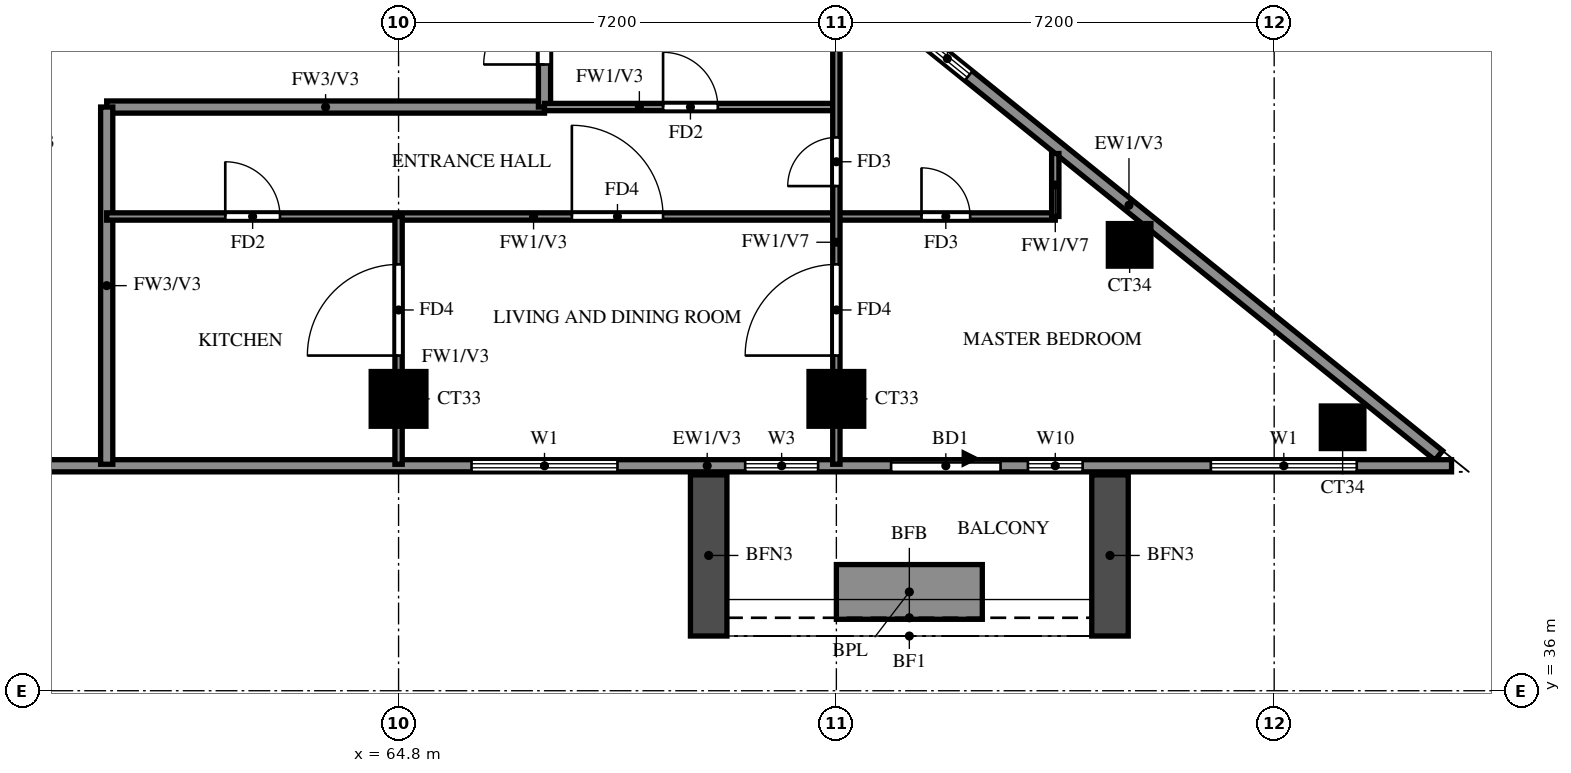
"""IFC4 building model, lengths in metres.
Left out: names, types, materials, properties, quantities, classifications, styles, units other than length and angle.
Written with IfcOpenShell. Run it as: python <this file> out.ifc"""

import sys

from ifc_helpers import new_model, si_unit, direction, frame, frame_2d, origin, origin_2d, place, context, subcontext, project, spatial, rectangle, extrude, source, transform, mapped, element, fill, save


model = new_model("IFC4")
c1 = context("Model", 3, precision=1e-05, world=origin(), true_north=direction((0.0, 1.0)))
c2 = subcontext(c1, "Body", "Model", "MODEL_VIEW")
j1 = project(units=[si_unit("LENGTHUNIT", "METRE"), si_unit("PLANEANGLEUNIT", "RADIAN")], contexts=[c1])
p1 = place(None, origin())
s1 = spatial("IfcSite", under=j1, at=p1, CompositionType="ELEMENT")
p2 = place(p1, origin())
s2 = spatial("IfcBuilding", under=s1, at=p2, CompositionType="ELEMENT")
p3 = place(p2, frame((0.0, 0.0, 218.5)))
s3 = spatial("IfcBuildingStorey", under=s2, at=p3, CompositionType="ELEMENT", Elevation=218.5)
m1 = source(origin(), c2, "Body", "SweptSolid", [
    extrude(rectangle(XDim=0.7, YDim=0.7, at=origin_2d()), origin(), (0.0, 0.0, 1.0), 3.22),
])
p4 = place(p3, frame((80.326, 40.333, 0.0), z_axis=(0.0, 0.0, 1.0), x_axis=(1.0, 0.0, 0.0)))
e1 = element("IfcColumn", 1, at=p4, inside=s3, PredefinedType="COLUMN", context=c2, shape_type="MappedRepresentation", body=[
    mapped(m1, transform((0.0, 0.0, 0.0))),
])
m2 = source(origin(), c2, "Body", "SweptSolid", [
    extrude(rectangle(XDim=0.9, YDim=0.9, at=origin_2d()), origin(), (0.0, 0.0, 1.0), 3.22),
])
for number, where, z_axis, x_axis in (
    (2, (64.8, 40.8, 0.0), (0.0, 0.0, 1.0), (1.0, 0.0, 0.0)),
    (3, (72.0, 40.8, 0.0), (0.0, 0.0, 1.0), (1.0, 0.0, 0.0)),
):
    element("IfcColumn", number, at=place(p3, frame(where, z_axis=z_axis, x_axis=x_axis)), inside=s3, PredefinedType="COLUMN", context=c2, shape_type="MappedRepresentation", body=[
        mapped(m2, transform((0.0, 0.0, 0.0))),
    ])
p5 = place(p3, frame((76.823, 43.333, 0.0), z_axis=(0.0, 0.0, 1.0), x_axis=(1.0, 0.0, 0.0)))
e4 = element("IfcColumn", 4, at=p5, inside=s3, PredefinedType="COLUMN", context=c2, shape_type="MappedRepresentation", body=[
    mapped(m1, transform((0.0, 0.0, 0.0))),
])
p6 = place(p3, frame((81.907, 39.87, 0.0), z_axis=(0.0, 0.0, 1.0), x_axis=(-0.777936274417, 0.62834318087, 0.0)))
e5 = element("IfcWall", 5, at=p6, inside=s3, PredefinedType="SOLIDWALL", context=c2, shape_type="SweptSolid", body=[
    extrude(rectangle(XDim=13.099, YDim=0.2, at=frame_2d((6.549, 0.0))), origin(), (0.0, 0.0, 1.0), 3.22),
])
p7 = place(p6, frame((9.938, 0.0, 1.5)))
e6 = element("IfcOpeningElement", 6, at=p7, cuts=e5, PredefinedType="OPENING", context=c2, shape_type="SweptSolid", body=[
    extrude(rectangle(XDim=0.9, YDim=0.9, at=frame_2d((0.45, 0.45))), frame((0.0, 0.11, 0.0), z_axis=(0.0, -1.0, 0.0), x_axis=(1.0, 0.0, 0.0)), (0.0, 0.0, 1.0), 0.22),
])
p8 = place(p3, frame((58.8, 39.7, 0.0), z_axis=(0.0, 0.0, 1.0), x_axis=(1.0, 0.0, 0.0)))
e7 = element("IfcWall", 7, at=p8, inside=s3, PredefinedType="SOLIDWALL", context=c2, shape_type="SweptSolid", body=[
    extrude(rectangle(XDim=23.317, YDim=0.2, at=frame_2d((11.658, 0.0))), origin(), (0.0, 0.0, 1.0), 3.22),
])
p9 = place(p8, frame((14.1, 0.0, 0.0)))
e8 = element("IfcOpeningElement", 8, at=p9, cuts=e7, PredefinedType="OPENING", context=c2, shape_type="SweptSolid", body=[
    extrude(rectangle(XDim=1.8, YDim=2.4, at=frame_2d((0.9, 1.2))), frame((0.0, 0.11, 0.0), z_axis=(0.0, -1.0, 0.0), x_axis=(1.0, 0.0, 0.0)), (0.0, 0.0, 1.0), 0.22),
])
p10 = place(p8, frame((7.2, 0.0, 0.6)))
e9 = element("IfcOpeningElement", 9, at=p10, cuts=e7, PredefinedType="OPENING", context=c2, shape_type="SweptSolid", body=[
    extrude(rectangle(XDim=2.4, YDim=2.4, at=frame_2d((1.2, 1.2))), frame((0.0, 0.11, 0.0), z_axis=(0.0, -1.0, 0.0), x_axis=(1.0, 0.0, 0.0)), (0.0, 0.0, 1.0), 0.22),
])
p11 = place(p8, frame((11.7, 0.0, 0.6)))
e10 = element("IfcOpeningElement", 10, at=p11, cuts=e7, PredefinedType="OPENING", context=c2, shape_type="SweptSolid", body=[
    extrude(rectangle(XDim=1.2, YDim=2.4, at=frame_2d((0.6, 1.2))), frame((0.0, 0.11, 0.0), z_axis=(0.0, -1.0, 0.0), x_axis=(1.0, 0.0, 0.0)), (0.0, 0.0, 1.0), 0.22),
])
p12 = place(p8, frame((16.35, 0.0, 0.6)))
e11 = element("IfcOpeningElement", 11, at=p12, cuts=e7, PredefinedType="OPENING", context=c2, shape_type="SweptSolid", body=[
    extrude(rectangle(XDim=0.9, YDim=2.4, at=frame_2d((0.45, 1.2))), frame((0.0, 0.11, 0.0), z_axis=(0.0, -1.0, 0.0), x_axis=(1.0, 0.0, 0.0)), (0.0, 0.0, 1.0), 0.22),
])
p13 = place(p8, frame((19.358, 0.0, 0.6)))
e12 = element("IfcOpeningElement", 12, at=p13, cuts=e7, PredefinedType="OPENING", context=c2, shape_type="SweptSolid", body=[
    extrude(rectangle(XDim=2.4, YDim=2.4, at=frame_2d((1.2, 1.2))), frame((0.0, 0.11, 0.0), z_axis=(0.0, -1.0, 0.0), x_axis=(1.0, 0.0, 0.0)), (0.0, 0.0, 1.0), 0.22),
])
for number, where, z_axis, x_axis in (
    (13, (69.9, 39.55, 0.0), (0.0, 0.0, 1.0), (0.0, -1.0, 0.0)),
    (14, (76.5, 39.55, 0.0), (0.0, 0.0, 1.0), (0.0, -1.0, 0.0)),
):
    element("IfcWall", number, at=place(p3, frame(where, z_axis=z_axis, x_axis=x_axis)), inside=s3, PredefinedType="SOLIDWALL", context=c2, shape_type="SweptSolid", body=[
        extrude(rectangle(XDim=2.65, YDim=0.6, at=frame_2d((1.325, 0.0))), origin(), (0.0, 0.0, 1.0), 2.85),
    ])
p14 = place(p3, frame((72.0, 37.625, 0.0), z_axis=(0.0, 0.0, 1.0), x_axis=(1.0, 0.0, 0.0)))
e15 = element("IfcWall", 15, at=p14, inside=s3, PredefinedType="SOLIDWALL", context=c2, shape_type="SweptSolid", body=[
    extrude(rectangle(XDim=2.4, YDim=0.9, at=frame_2d((1.2, 0.0))), origin(), (0.0, 0.0, 1.0), 0.9),
])
p15 = place(p3, frame((60.0, 45.6, 0.0), z_axis=(0.0, 0.0, 1.0), x_axis=(1.0, 0.0, 0.0)))
e16 = element("IfcWall", 16, at=p15, inside=s3, PredefinedType="SOLIDWALL", context=c2, shape_type="SweptSolid", body=[
    extrude(rectangle(XDim=7.2, YDim=0.2, at=frame_2d((3.6, 0.0))), origin(), (0.0, 0.0, 1.0), 3.22),
])
p16 = place(p3, frame((60.0, 39.725, 0.0), z_axis=(0.0, 0.0, 1.0), x_axis=(0.0, 1.0, 0.0)))
e17 = element("IfcWall", 17, at=p16, inside=s3, PredefinedType="SOLIDWALL", context=c2, shape_type="SweptSolid", body=[
    extrude(rectangle(XDim=5.875, YDim=0.2, at=frame_2d((2.938, 0.0))), origin(), (0.0, 0.0, 1.0), 3.22),
])
p17 = place(p3, frame((67.2, 45.6, 0.0), z_axis=(0.0, 0.0, 1.0), x_axis=(0.0, 1.0, 0.0)))
e18 = element("IfcWall", 18, at=p17, inside=s3, PredefinedType="SOLIDWALL", context=c2, shape_type="SweptSolid", body=[
    extrude(rectangle(XDim=8.4, YDim=0.2, at=frame_2d((4.2, 0.0))), origin(), (0.0, 0.0, 1.0), 3.22),
])
p18 = place(p17, frame((6.7, 0.0, 0.0)))
e19 = element("IfcOpeningElement", 19, at=p18, cuts=e18, PredefinedType="OPENING", context=c2, shape_type="SweptSolid", body=[
    extrude(rectangle(XDim=1.0, YDim=2.1, at=frame_2d((0.5, 1.05))), frame((0.0, 0.11, 0.0), z_axis=(0.0, -1.0, 0.0), x_axis=(1.0, 0.0, 0.0)), (0.0, 0.0, 1.0), 0.22),
])
p19 = place(p17, frame((0.7, 0.0, 0.0)))
e20 = element("IfcOpeningElement", 20, at=p19, cuts=e18, PredefinedType="OPENING", context=c2, shape_type="SweptSolid", body=[
    extrude(rectangle(XDim=1.0, YDim=2.1, at=frame_2d((0.5, 1.05))), frame((0.0, 0.11, 0.0), z_axis=(0.0, -1.0, 0.0), x_axis=(1.0, 0.0, 0.0)), (0.0, 0.0, 1.0), 0.22),
])
p20 = place(p3, frame((60.0, 43.8, 0.0), z_axis=(0.0, 0.0, 1.0), x_axis=(1.0, 0.0, 0.0)))
e21 = element("IfcWall", 21, at=p20, inside=s3, PredefinedType="PARTITIONING", context=c2, shape_type="SweptSolid", body=[
    extrude(rectangle(XDim=15.6, YDim=0.12, at=frame_2d((7.8, 0.0))), origin(), (0.0, 0.0, 1.0), 3.22),
])
p21 = place(p20, frame((7.65, 0.0, 0.0)))
e22 = element("IfcOpeningElement", 22, at=p21, cuts=e21, PredefinedType="OPENING", context=c2, shape_type="SweptSolid", body=[
    extrude(rectangle(XDim=1.5, YDim=2.1, at=frame_2d((0.75, 1.05))), frame((0.0, 0.07, 0.0), z_axis=(0.0, -1.0, 0.0), x_axis=(1.0, 0.0, 0.0)), (0.0, 0.0, 1.0), 0.14),
])
p22 = place(p20, frame((1.95, 0.0, 0.0)))
e23 = element("IfcOpeningElement", 23, at=p22, cuts=e21, PredefinedType="OPENING", context=c2, shape_type="SweptSolid", body=[
    extrude(rectangle(XDim=0.9, YDim=2.1, at=frame_2d((0.45, 1.05))), frame((0.0, 0.07, 0.0), z_axis=(0.0, -1.0, 0.0), x_axis=(1.0, 0.0, 0.0)), (0.0, 0.0, 1.0), 0.14),
])
p23 = place(p20, frame((13.4, 0.0, 0.0)))
e24 = element("IfcOpeningElement", 24, at=p23, cuts=e21, PredefinedType="OPENING", context=c2, shape_type="SweptSolid", body=[
    extrude(rectangle(XDim=0.8, YDim=2.1, at=frame_2d((0.4, 1.05))), frame((0.0, 0.07, 0.0), z_axis=(0.0, -1.0, 0.0), x_axis=(1.0, 0.0, 0.0)), (0.0, 0.0, 1.0), 0.14),
])
p24 = place(p3, frame((67.2, 45.6, 0.0), z_axis=(0.0, 0.0, 1.0), x_axis=(1.0, 0.0, 0.0)))
e25 = element("IfcWall", 25, at=p24, inside=s3, PredefinedType="PARTITIONING", context=c2, shape_type="SweptSolid", body=[
    extrude(rectangle(XDim=4.8, YDim=0.12, at=frame_2d((2.4, 0.0))), origin(), (0.0, 0.0, 1.0), 3.22),
])
p25 = place(p24, frame((1.95, 0.0, 0.0)))
e26 = element("IfcOpeningElement", 26, at=p25, cuts=e25, PredefinedType="OPENING", context=c2, shape_type="SweptSolid", body=[
    extrude(rectangle(XDim=0.9, YDim=2.1, at=frame_2d((0.45, 1.05))), frame((0.0, 0.07, 0.0), z_axis=(0.0, -1.0, 0.0), x_axis=(1.0, 0.0, 0.0)), (0.0, 0.0, 1.0), 0.14),
])
p26 = place(p3, frame((64.8, 39.725, 0.0), z_axis=(0.0, 0.0, 1.0), x_axis=(0.0, 1.0, 0.0)))
e27 = element("IfcWall", 27, at=p26, inside=s3, PredefinedType="PARTITIONING", context=c2, shape_type="SweptSolid", body=[
    extrude(rectangle(XDim=4.075, YDim=0.12, at=frame_2d((2.038, 0.0))), origin(), (0.0, 0.0, 1.0), 3.22),
])
p27 = place(p26, frame((1.788, 0.0, 0.0)))
e28 = element("IfcOpeningElement", 28, at=p27, cuts=e27, PredefinedType="OPENING", context=c2, shape_type="SweptSolid", body=[
    extrude(rectangle(XDim=1.5, YDim=2.1, at=frame_2d((0.75, 1.05))), frame((0.0, 0.07, 0.0), z_axis=(0.0, -1.0, 0.0), x_axis=(1.0, 0.0, 0.0)), (0.0, 0.0, 1.0), 0.14),
])
p28 = place(p3, frame((72.0, 39.725, 0.0), z_axis=(0.0, 0.0, 1.0), x_axis=(0.0, 1.0, 0.0)))
e29 = element("IfcWall", 29, at=p28, inside=s3, PredefinedType="PARTITIONING", context=c2, shape_type="SweptSolid", body=[
    extrude(rectangle(XDim=8.114, YDim=0.12, at=frame_2d((4.057, 0.0))), origin(), (0.0, 0.0, 1.0), 2.32),
])
p29 = place(p28, frame((1.788, 0.0, 0.0)))
e30 = element("IfcOpeningElement", 30, at=p29, cuts=e29, PredefinedType="OPENING", context=c2, shape_type="SweptSolid", body=[
    extrude(rectangle(XDim=1.5, YDim=2.1, at=frame_2d((0.75, 1.05))), frame((0.0, 0.07, 0.0), z_axis=(0.0, -1.0, 0.0), x_axis=(1.0, 0.0, 0.0)), (0.0, 0.0, 1.0), 0.14),
])
p30 = place(p28, frame((4.575, 0.0, 0.0)))
e31 = element("IfcOpeningElement", 31, at=p30, cuts=e29, PredefinedType="OPENING", context=c2, shape_type="SweptSolid", body=[
    extrude(rectangle(XDim=0.8, YDim=2.1, at=frame_2d((0.4, 1.05))), frame((0.0, 0.07, 0.0), z_axis=(0.0, -1.0, 0.0), x_axis=(1.0, 0.0, 0.0)), (0.0, 0.0, 1.0), 0.14),
])
p31 = place(p3, frame((75.6, 43.8, 0.0), z_axis=(0.0, 0.0, 1.0), x_axis=(0.0, 1.0, 0.0)))
e32 = element("IfcWall", 32, at=p31, inside=s3, PredefinedType="PARTITIONING", context=c2, shape_type="SweptSolid", body=[
    extrude(rectangle(XDim=1.035, YDim=0.12, at=frame_2d((0.518, 0.0))), origin(), (0.0, 0.0, 1.0), 2.32),
])
p32 = place(p7, origin())
e33 = element("IfcWindow", 33, at=p32, inside=s3, PartitioningType="SINGLE_PANEL", PredefinedType="WINDOW", context=c2, shape_type="SweptSolid", body=[
    extrude(rectangle(XDim=0.9, YDim=0.9, at=frame_2d((0.45, 0.45))), frame((0.0, 0.03, 0.0), z_axis=(0.0, -1.0, 0.0), x_axis=(1.0, 0.0, 0.0)), (0.0, 0.0, 1.0), 0.06),
])
fill(e6, e33)
p33 = place(p9, origin())
e34 = element("IfcDoor", 34, at=p33, inside=s3, OperationType="DOUBLE_DOOR_SLIDING", PredefinedType="DOOR", context=c2, shape_type="SweptSolid", body=[
    extrude(rectangle(XDim=1.8, YDim=2.4, at=frame_2d((0.9, 1.2))), frame((0.0, 0.025, 0.0), z_axis=(0.0, -1.0, 0.0), x_axis=(1.0, 0.0, 0.0)), (0.0, 0.0, 1.0), 0.05),
])
fill(e8, e34)
p34 = place(p10, origin())
e35 = element("IfcWindow", 35, at=p34, inside=s3, PartitioningType="DOUBLE_PANEL_VERTICAL", PredefinedType="WINDOW", context=c2, shape_type="SweptSolid", body=[
    extrude(rectangle(XDim=2.4, YDim=2.4, at=frame_2d((1.2, 1.2))), frame((0.0, 0.03, 0.0), z_axis=(0.0, -1.0, 0.0), x_axis=(1.0, 0.0, 0.0)), (0.0, 0.0, 1.0), 0.06),
])
fill(e9, e35)
p35 = place(p11, origin())
e36 = element("IfcWindow", 36, at=p35, inside=s3, PartitioningType="SINGLE_PANEL", PredefinedType="WINDOW", context=c2, shape_type="SweptSolid", body=[
    extrude(rectangle(XDim=1.2, YDim=2.4, at=frame_2d((0.6, 1.2))), frame((0.0, 0.03, 0.0), z_axis=(0.0, -1.0, 0.0), x_axis=(1.0, 0.0, 0.0)), (0.0, 0.0, 1.0), 0.06),
])
fill(e10, e36)
p36 = place(p12, origin())
e37 = element("IfcWindow", 37, at=p36, inside=s3, PartitioningType="SINGLE_PANEL", PredefinedType="WINDOW", context=c2, shape_type="SweptSolid", body=[
    extrude(rectangle(XDim=0.9, YDim=2.4, at=frame_2d((0.45, 1.2))), frame((0.0, 0.03, 0.0), z_axis=(0.0, -1.0, 0.0), x_axis=(1.0, 0.0, 0.0)), (0.0, 0.0, 1.0), 0.06),
])
fill(e11, e37)
p37 = place(p13, origin())
e38 = element("IfcWindow", 38, at=p37, inside=s3, PartitioningType="DOUBLE_PANEL_VERTICAL", PredefinedType="WINDOW", context=c2, shape_type="SweptSolid", body=[
    extrude(rectangle(XDim=2.4, YDim=2.4, at=frame_2d((1.2, 1.2))), frame((0.0, 0.03, 0.0), z_axis=(0.0, -1.0, 0.0), x_axis=(1.0, 0.0, 0.0)), (0.0, 0.0, 1.0), 0.06),
])
fill(e12, e38)
p38 = place(p27, origin())
e39 = element("IfcDoor", 39, at=p38, inside=s3, OperationType="SINGLE_SWING_RIGHT", PredefinedType="DOOR", context=c2, shape_type="SweptSolid", body=[
    extrude(rectangle(XDim=1.5, YDim=2.1, at=frame_2d((0.75, 1.05))), frame((0.0, 0.025, 0.0), z_axis=(0.0, -1.0, 0.0), x_axis=(1.0, 0.0, 0.0)), (0.0, 0.0, 1.0), 0.05),
])
fill(e28, e39)
p39 = place(p25, origin())
e40 = element("IfcDoor", 40, at=p39, inside=s3, OperationType="SINGLE_SWING_LEFT", PredefinedType="DOOR", context=c2, shape_type="SweptSolid", body=[
    extrude(rectangle(XDim=0.9, YDim=2.1, at=frame_2d((0.45, 1.05))), frame((0.0, 0.025, 0.0), z_axis=(0.0, -1.0, 0.0), x_axis=(1.0, 0.0, 0.0)), (0.0, 0.0, 1.0), 0.05),
])
fill(e26, e40)
p40 = place(p19, origin())
e41 = element("IfcDoor", 41, at=p40, inside=s3, OperationType="SINGLE_SWING_RIGHT", PredefinedType="DOOR", context=c2, shape_type="SweptSolid", body=[
    extrude(rectangle(XDim=1.0, YDim=2.1, at=frame_2d((0.5, 1.05))), frame((0.0, 0.025, 0.0), z_axis=(0.0, -1.0, 0.0), x_axis=(1.0, 0.0, 0.0)), (0.0, 0.0, 1.0), 0.05),
])
fill(e20, e41)
p41 = place(p21, origin())
e42 = element("IfcDoor", 42, at=p41, inside=s3, OperationType="SINGLE_SWING_LEFT", PredefinedType="DOOR", context=c2, shape_type="SweptSolid", body=[
    extrude(rectangle(XDim=1.5, YDim=2.1, at=frame_2d((0.75, 1.05))), frame((0.0, 0.025, 0.0), z_axis=(0.0, -1.0, 0.0), x_axis=(1.0, 0.0, 0.0)), (0.0, 0.0, 1.0), 0.05),
])
fill(e22, e42)
p42 = place(p22, origin())
e43 = element("IfcDoor", 43, at=p42, inside=s3, OperationType="SINGLE_SWING_LEFT", PredefinedType="DOOR", context=c2, shape_type="SweptSolid", body=[
    extrude(rectangle(XDim=0.9, YDim=2.1, at=frame_2d((0.45, 1.05))), frame((0.0, 0.025, 0.0), z_axis=(0.0, -1.0, 0.0), x_axis=(1.0, 0.0, 0.0)), (0.0, 0.0, 1.0), 0.05),
])
fill(e23, e43)
p43 = place(p29, origin())
e44 = element("IfcDoor", 44, at=p43, inside=s3, OperationType="SINGLE_SWING_LEFT", PredefinedType="DOOR", context=c2, shape_type="SweptSolid", body=[
    extrude(rectangle(XDim=1.5, YDim=2.1, at=frame_2d((0.75, 1.05))), frame((0.0, 0.025, 0.0), z_axis=(0.0, -1.0, 0.0), x_axis=(1.0, 0.0, 0.0)), (0.0, 0.0, 1.0), 0.05),
])
fill(e30, e44)
p44 = place(p30, origin())
e45 = element("IfcDoor", 45, at=p44, inside=s3, OperationType="SINGLE_SWING_LEFT", PredefinedType="DOOR", context=c2, shape_type="SweptSolid", body=[
    extrude(rectangle(XDim=0.8, YDim=2.1, at=frame_2d((0.4, 1.05))), frame((0.0, 0.025, 0.0), z_axis=(0.0, -1.0, 0.0), x_axis=(1.0, 0.0, 0.0)), (0.0, 0.0, 1.0), 0.05),
])
fill(e31, e45)
p45 = place(p23, origin())
e46 = element("IfcDoor", 46, at=p45, inside=s3, OperationType="SINGLE_SWING_LEFT", PredefinedType="DOOR", context=c2, shape_type="SweptSolid", body=[
    extrude(rectangle(XDim=0.8, YDim=2.1, at=frame_2d((0.4, 1.05))), frame((0.0, 0.025, 0.0), z_axis=(0.0, -1.0, 0.0), x_axis=(1.0, 0.0, 0.0)), (0.0, 0.0, 1.0), 0.05),
])
fill(e24, e46)
save(model, sys.argv[1])
